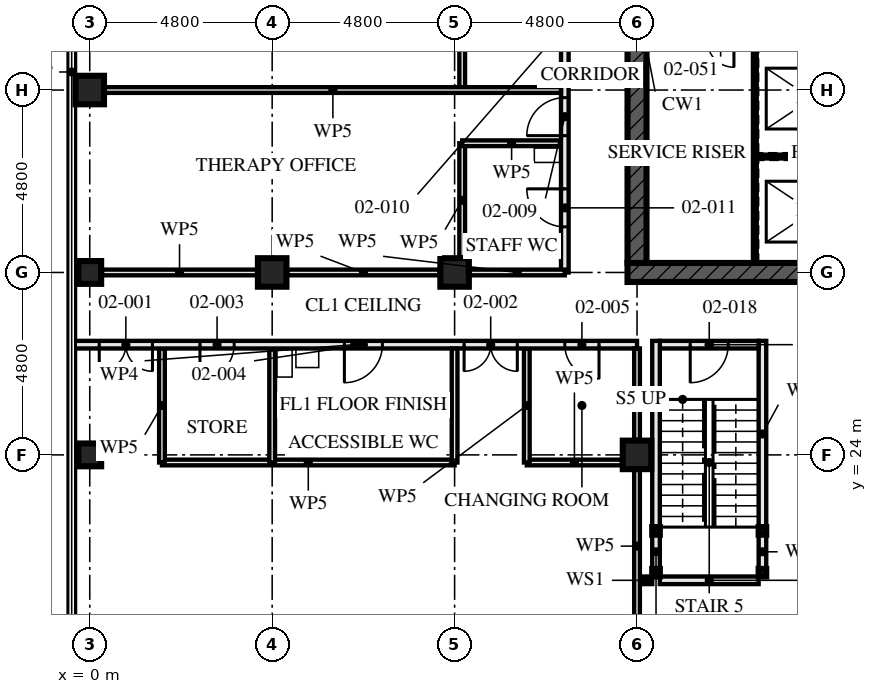
"""IFC4 building model, lengths in metres.
Left out: names, types, materials, properties, quantities, classifications, styles, units other than length and angle.
Written with IfcOpenShell. Run it as: python <this file> out.ifc"""

import sys

from ifc_helpers import new_model, si_unit, direction, frame, frame_2d, origin, origin_2d, place, context, subcontext, project, spatial, rectangle, hollow_rectangle, extrude, element, fill, save


model = new_model("IFC4")
c1 = context("Model", 3, precision=1e-05, world=origin(), true_north=direction((0.0, 1.0)))
c2 = subcontext(c1, "Body", "Model", "MODEL_VIEW")
j1 = project(units=[si_unit("LENGTHUNIT", "METRE"), si_unit("PLANEANGLEUNIT", "RADIAN")], contexts=[c1])
p1 = place(None, origin())
s1 = spatial("IfcSite", under=j1, at=p1, CompositionType="ELEMENT")
p2 = place(p1, origin())
s2 = spatial("IfcBuilding", under=s1, at=p2, CompositionType="ELEMENT")
p3 = place(p2, frame((0.0, 0.0, 9.0)))
s3 = spatial("IfcBuildingStorey", under=s2, at=p3, CompositionType="ELEMENT", Elevation=9.0)
for number, where, z_axis, x_axis in (
    (1, (0.0, 24.0, 0.0), (0.0, 0.0, 1.0), (1.0, 0.0, 0.0)),
    (2, (0.0, 28.8, 0.0), (0.0, 0.0, 1.0), (0.0, 1.0, 0.0)),
):
    element("IfcColumn", number, at=place(p3, frame(where, z_axis=z_axis, x_axis=x_axis)), inside=s3, PredefinedType="COLUMN", context=c2, shape_type="SweptSolid", body=[
        extrude(hollow_rectangle(XDim=0.6, YDim=0.6, WallThickness=0.08, at=origin_2d()), origin(), (0.0, 0.0, 1.0), 4.5),
    ])
for number, where, z_axis, x_axis in (
    (3, (0.0, 33.6, 0.0), (0.0, 0.0, 1.0), (1.0, 0.0, 0.0)),
    (4, (4.8, 28.8, 0.0), (0.0, 0.0, 1.0), (0.0, 1.0, 0.0)),
    (5, (9.6, 28.8, 0.0), (0.0, 0.0, 1.0), (0.0, 1.0, 0.0)),
    (6, (14.4, 24.0, 0.0), (0.0, 0.0, 1.0), (1.0, 0.0, 0.0)),
):
    element("IfcColumn", number, at=place(p3, frame(where, z_axis=z_axis, x_axis=x_axis)), inside=s3, PredefinedType="COLUMN", context=c2, shape_type="SweptSolid", body=[
        extrude(hollow_rectangle(XDim=0.75, YDim=0.75, WallThickness=0.08, at=origin_2d()), origin(), (0.0, 0.0, 1.0), 4.5),
    ])
p4 = place(p3, frame((14.15, 28.8, -0.17), z_axis=(0.0, 0.0, 1.0), x_axis=(1.0, 0.0, 0.0)))
e7 = element("IfcWall", 7, at=p4, inside=s3, PredefinedType="SHEAR", context=c2, shape_type="SweptSolid", body=[
    extrude(rectangle(XDim=14.9, YDim=0.5, at=frame_2d((7.45, 0.0))), origin(), (0.0, 0.0, 1.0), 4.5),
])
p5 = place(p4, frame((6.85, 0.0, 0.17)))
e8 = element("IfcOpeningElement", 8, at=p5, cuts=e7, PredefinedType="OPENING", context=c2, shape_type="SweptSolid", body=[
    extrude(rectangle(XDim=1.2, YDim=2.1, at=frame_2d((0.6, 1.05))), frame((0.0, 0.26, 0.0), z_axis=(0.0, -1.0, 0.0), x_axis=(1.0, 0.0, 0.0)), (0.0, 0.0, 1.0), 0.521),
])
p6 = place(p3, frame((14.4, 42.95, -0.17), z_axis=(0.0, 0.0, 1.0), x_axis=(0.0, -1.0, 0.0)))
e9 = element("IfcWall", 9, at=p6, inside=s3, PredefinedType="SHEAR", context=c2, shape_type="SweptSolid", body=[
    extrude(rectangle(XDim=13.9, YDim=0.5, at=frame_2d((6.95, 0.0))), origin(), (0.0, 0.0, 1.0), 4.5),
])
p7 = place(p6, frame((6.35, 0.0, 0.17)))
e10 = element("IfcOpeningElement", 10, at=p7, cuts=e9, PredefinedType="OPENING", context=c2, shape_type="SweptSolid", body=[
    extrude(rectangle(XDim=1.2, YDim=2.1, at=frame_2d((0.6, 1.05))), frame((0.0, 0.26, 0.0), z_axis=(0.0, -1.0, 0.0), x_axis=(1.0, 0.0, 0.0)), (0.0, 0.0, 1.0), 0.521),
])
for number, where, z_axis, x_axis in (
    (11, (14.9, 20.9, 0.0), (0.0, 0.0, 1.0), (1.0, 0.0, 0.0)),
    (12, (17.7, 20.9, 0.0), (0.0, 0.0, 1.0), (1.0, 0.0, 0.0)),
    (13, (14.9, 22.0, 0.0), (0.0, 0.0, 1.0), (1.0, 0.0, 0.0)),
    (14, (17.7, 22.0, 0.0), (0.0, 0.0, 1.0), (1.0, 0.0, 0.0)),
):
    element("IfcColumn", number, at=place(p3, frame(where, z_axis=z_axis, x_axis=x_axis)), inside=s3, PredefinedType="COLUMN", context=c2, shape_type="SweptSolid", body=[
        extrude(hollow_rectangle(XDim=0.2, YDim=0.2, WallThickness=0.008, at=origin_2d()), origin(), (0.0, 0.0, 1.0), 4.33),
    ])
for number, where, z_axis, x_axis in (
    (15, (9.6, 23.8, 0.0), (0.0, 0.0, 1.0), (0.0, 1.0, 0.0)),
    (16, (1.9, 23.8, 0.0), (0.0, 0.0, 1.0), (0.0, 1.0, 0.0)),
):
    element("IfcWall", number, at=place(p3, frame(where, z_axis=z_axis, x_axis=x_axis)), inside=s3, PredefinedType="PARTITIONING", context=c2, shape_type="SweptSolid", body=[
        extrude(rectangle(XDim=3.0, YDim=0.15, at=frame_2d((1.5, 0.0))), origin(), (0.0, 0.0, 1.0), 3.55),
    ])
p8 = place(p3, frame((1.9, 23.8, 0.0), z_axis=(0.0, 0.0, 1.0), x_axis=(1.0, 0.0, 0.0)))
e17 = element("IfcWall", 17, at=p8, inside=s3, PredefinedType="PARTITIONING", context=c2, shape_type="SweptSolid", body=[
    extrude(rectangle(XDim=7.7, YDim=0.15, at=frame_2d((3.85, 0.0))), origin(), (0.0, 0.0, 1.0), 4.33),
])
for number, where, z_axis, x_axis in (
    (18, (4.8, 23.8, 0.0), (0.0, 0.0, 1.0), (0.0, 1.0, 0.0)),
    (19, (11.5, 23.8, 0.0), (0.0, 0.0, 1.0), (0.0, 1.0, 0.0)),
):
    element("IfcWall", number, at=place(p3, frame(where, z_axis=z_axis, x_axis=x_axis)), inside=s3, PredefinedType="PARTITIONING", context=c2, shape_type="SweptSolid", body=[
        extrude(rectangle(XDim=3.0, YDim=0.15, at=frame_2d((1.5, 0.0))), origin(), (0.0, 0.0, 1.0), 3.55),
    ])
p9 = place(p3, frame((11.5, 23.8, 0.0), z_axis=(0.0, 0.0, 1.0), x_axis=(1.0, 0.0, 0.0)))
e20 = element("IfcWall", 20, at=p9, inside=s3, PredefinedType="PARTITIONING", context=c2, shape_type="SweptSolid", body=[
    extrude(rectangle(XDim=2.505, YDim=0.15, at=frame_2d((1.252, 0.0))), origin(), (0.0, 0.0, 1.0), 4.33),
])
p10 = place(p3, frame((-0.455, 26.9, 0.0), z_axis=(0.0, 0.0, 1.0), x_axis=(1.0, 0.0, 0.0)))
e21 = element("IfcWall", 21, at=p10, inside=s3, PredefinedType="PARTITIONING", context=c2, shape_type="SweptSolid", body=[
    extrude(rectangle(XDim=14.855, YDim=0.2, at=frame_2d((7.427, 0.0))), origin(), (0.0, 0.0, 1.0), 3.32),
])
p11 = place(p10, frame((0.705, 0.0, 0.0)))
e22 = element("IfcOpeningElement", 22, at=p11, cuts=e21, PredefinedType="OPENING", context=c2, shape_type="SweptSolid", body=[
    extrude(rectangle(XDim=1.4, YDim=2.4, at=frame_2d((0.7, 1.2))), frame((0.0, 0.111, 0.0), z_axis=(0.0, -1.0, 0.0), x_axis=(1.0, 0.0, 0.0)), (0.0, 0.0, 1.0), 0.221),
])
p12 = place(p10, frame((10.305, 0.0, 0.0)))
e23 = element("IfcOpeningElement", 23, at=p12, cuts=e21, PredefinedType="OPENING", context=c2, shape_type="SweptSolid", body=[
    extrude(rectangle(XDim=1.4, YDim=2.4, at=frame_2d((0.7, 1.2))), frame((0.0, 0.111, 0.0), z_axis=(0.0, -1.0, 0.0), x_axis=(1.0, 0.0, 0.0)), (0.0, 0.0, 1.0), 0.221),
])
p13 = place(p10, frame((3.355, 0.0, 0.0)))
e24 = element("IfcOpeningElement", 24, at=p13, cuts=e21, PredefinedType="OPENING", context=c2, shape_type="SweptSolid", body=[
    extrude(rectangle(XDim=0.9, YDim=2.1, at=frame_2d((0.45, 1.05))), frame((0.0, 0.111, 0.0), z_axis=(0.0, -1.0, 0.0), x_axis=(1.0, 0.0, 0.0)), (0.0, 0.0, 1.0), 0.221),
])
p14 = place(p10, frame((7.155, 0.0, 0.0)))
e25 = element("IfcOpeningElement", 25, at=p14, cuts=e21, PredefinedType="OPENING", context=c2, shape_type="SweptSolid", body=[
    extrude(rectangle(XDim=1.0, YDim=2.1, at=frame_2d((0.5, 1.05))), frame((0.0, 0.111, 0.0), z_axis=(0.0, -1.0, 0.0), x_axis=(1.0, 0.0, 0.0)), (0.0, 0.0, 1.0), 0.221),
])
p15 = place(p10, frame((12.955, 0.0, 0.0)))
e26 = element("IfcOpeningElement", 26, at=p15, cuts=e21, PredefinedType="OPENING", context=c2, shape_type="SweptSolid", body=[
    extrude(rectangle(XDim=0.9, YDim=2.1, at=frame_2d((0.45, 1.05))), frame((0.0, 0.111, 0.0), z_axis=(0.0, -1.0, 0.0), x_axis=(1.0, 0.0, 0.0)), (0.0, 0.0, 1.0), 0.221),
])
p16 = place(p3, frame((9.8, 37.0, 0.0), z_axis=(0.0, 0.0, 1.0), x_axis=(0.0, -1.0, 0.0)))
e27 = element("IfcWall", 27, at=p16, inside=s3, PredefinedType="PARTITIONING", context=c2, shape_type="SweptSolid", body=[
    extrude(rectangle(XDim=3.4, YDim=0.15, at=frame_2d((1.7, 0.0))), origin(), (0.0, 0.0, 1.0), 4.33),
])
p17 = place(p3, frame((9.8, 32.2, 0.0), z_axis=(0.0, 0.0, 1.0), x_axis=(1.0, 0.0, 0.0)))
e28 = element("IfcWall", 28, at=p17, inside=s3, PredefinedType="PARTITIONING", context=c2, shape_type="SweptSolid", body=[
    extrude(rectangle(XDim=2.6, YDim=0.15, at=frame_2d((1.3, 0.0))), origin(), (0.0, 0.0, 1.0), 4.33),
])
p18 = place(p3, frame((9.8, 32.2, 0.0), z_axis=(0.0, 0.0, 1.0), x_axis=(0.0, -1.0, 0.0)))
e29 = element("IfcWall", 29, at=p18, inside=s3, PredefinedType="PARTITIONING", context=c2, shape_type="SweptSolid", body=[
    extrude(rectangle(XDim=3.005, YDim=0.15, at=frame_2d((1.502, 0.0))), origin(), (0.0, 0.0, 1.0), 4.33),
])
p19 = place(p3, frame((0.395, 33.6, 0.0), z_axis=(0.0, 0.0, 1.0), x_axis=(1.0, 0.0, 0.0)))
e30 = element("IfcWall", 30, at=p19, inside=s3, PredefinedType="PARTITIONING", context=c2, shape_type="SweptSolid", body=[
    extrude(rectangle(XDim=12.005, YDim=0.15, at=frame_2d((6.002, 0.0))), origin(), (0.0, 0.0, 1.0), 3.55),
])
p20 = place(p3, frame((12.5, 43.2, 0.0), z_axis=(0.0, 0.0, 1.0), x_axis=(0.0, -1.0, 0.0)))
e31 = element("IfcWall", 31, at=p20, inside=s3, PredefinedType="PARTITIONING", context=c2, shape_type="SweptSolid", body=[
    extrude(rectangle(XDim=14.4, YDim=0.2, at=frame_2d((7.2, 0.0))), origin(), (0.0, 0.0, 1.0), 3.55),
])
p21 = place(p20, frame((1.4, 0.0, 0.0)))
e32 = element("IfcOpeningElement", 32, at=p21, cuts=e31, PredefinedType="OPENING", context=c2, shape_type="SweptSolid", body=[
    extrude(rectangle(XDim=1.0, YDim=2.1, at=frame_2d((0.5, 1.05))), frame((0.0, 0.111, 0.0), z_axis=(0.0, -1.0, 0.0), x_axis=(1.0, 0.0, 0.0)), (0.0, 0.0, 1.0), 0.221),
])
p22 = place(p20, frame((3.6, 0.0, 0.0)))
e33 = element("IfcOpeningElement", 33, at=p22, cuts=e31, PredefinedType="OPENING", context=c2, shape_type="SweptSolid", body=[
    extrude(rectangle(XDim=1.0, YDim=2.4, at=frame_2d((0.5, 1.2))), frame((0.0, 0.111, 0.0), z_axis=(0.0, -1.0, 0.0), x_axis=(1.0, 0.0, 0.0)), (0.0, 0.0, 1.0), 0.221),
])
p23 = place(p20, frame((5.0, 0.0, 0.0)))
e34 = element("IfcOpeningElement", 34, at=p23, cuts=e31, PredefinedType="OPENING", context=c2, shape_type="SweptSolid", body=[
    extrude(rectangle(XDim=1.0, YDim=2.4, at=frame_2d((0.5, 1.2))), frame((0.0, 0.111, 0.0), z_axis=(0.0, -1.0, 0.0), x_axis=(1.0, 0.0, 0.0)), (0.0, 0.0, 1.0), 0.221),
])
p24 = place(p20, frame((9.8, 0.0, 0.0)))
e35 = element("IfcOpeningElement", 35, at=p24, cuts=e31, PredefinedType="OPENING", context=c2, shape_type="SweptSolid", body=[
    extrude(rectangle(XDim=1.0, YDim=2.4, at=frame_2d((0.5, 1.2))), frame((0.0, 0.111, 0.0), z_axis=(0.0, -1.0, 0.0), x_axis=(1.0, 0.0, 0.0)), (0.0, 0.0, 1.0), 0.221),
])
p25 = place(p20, frame((7.45, 0.0, 0.0)))
e36 = element("IfcOpeningElement", 36, at=p25, cuts=e31, PredefinedType="OPENING", context=c2, shape_type="SweptSolid", body=[
    extrude(rectangle(XDim=0.9, YDim=2.1, at=frame_2d((0.45, 1.05))), frame((0.0, 0.111, 0.0), z_axis=(0.0, -1.0, 0.0), x_axis=(1.0, 0.0, 0.0)), (0.0, 0.0, 1.0), 0.221),
])
p26 = place(p20, frame((12.2, 0.0, 0.0)))
e37 = element("IfcOpeningElement", 37, at=p26, cuts=e31, PredefinedType="OPENING", context=c2, shape_type="SweptSolid", body=[
    extrude(rectangle(XDim=1.0, YDim=2.1, at=frame_2d((0.5, 1.05))), frame((0.0, 0.111, 0.0), z_axis=(0.0, -1.0, 0.0), x_axis=(1.0, 0.0, 0.0)), (0.0, 0.0, 1.0), 0.221),
])
p27 = place(p3, frame((14.9, 21.0, 0.0), z_axis=(0.0, 0.0, 1.0), x_axis=(0.0, 1.0, 0.0)))
e38 = element("IfcWall", 38, at=p27, inside=s3, PredefinedType="SOLIDWALL", context=c2, shape_type="SweptSolid", body=[
    extrude(rectangle(XDim=0.9, YDim=0.2, at=frame_2d((0.45, 0.0))), origin(), (0.0, 0.0, 1.0), 3.99),
])
p28 = place(p3, frame((14.9, 22.1, 0.0), z_axis=(0.0, 0.0, 1.0), x_axis=(0.0, 1.0, 0.0)))
e39 = element("IfcWall", 39, at=p28, inside=s3, PredefinedType="SOLIDWALL", context=c2, shape_type="SweptSolid", body=[
    extrude(rectangle(XDim=4.9, YDim=0.2, at=frame_2d((2.45, 0.0))), origin(), (0.0, 0.0, 1.0), 3.99),
])
p29 = place(p3, frame((17.7, 21.0, 0.0), z_axis=(0.0, 0.0, 1.0), x_axis=(0.0, 1.0, 0.0)))
e40 = element("IfcWall", 40, at=p29, inside=s3, PredefinedType="SOLIDWALL", context=c2, shape_type="SweptSolid", body=[
    extrude(rectangle(XDim=0.9, YDim=0.2, at=frame_2d((0.45, 0.0))), origin(), (0.0, 0.0, 1.0), 3.99),
])
p30 = place(p3, frame((17.7, 22.1, 0.0), z_axis=(0.0, 0.0, 1.0), x_axis=(0.0, 1.0, 0.0)))
e41 = element("IfcWall", 41, at=p30, inside=s3, PredefinedType="SOLIDWALL", context=c2, shape_type="SweptSolid", body=[
    extrude(rectangle(XDim=4.9, YDim=0.2, at=frame_2d((2.45, 0.0))), origin(), (0.0, 0.0, 1.0), 3.99),
])
p31 = place(p3, frame((14.475, 20.7, 0.0), z_axis=(0.0, 0.0, 1.0), x_axis=(1.0, 0.0, 0.0)))
e42 = element("IfcWall", 42, at=p31, inside=s3, PredefinedType="SOLIDWALL", context=c2, shape_type="SweptSolid", body=[
    extrude(rectangle(XDim=0.325, YDim=0.2, at=frame_2d((0.163, 0.0))), origin(), (0.0, 0.0, 1.0), 4.33),
])
p32 = place(p3, frame((15.0, 20.7, 0.0), z_axis=(0.0, 0.0, 1.0), x_axis=(1.0, 0.0, 0.0)))
e43 = element("IfcWall", 43, at=p32, inside=s3, PredefinedType="SOLIDWALL", context=c2, shape_type="SweptSolid", body=[
    extrude(rectangle(XDim=2.6, YDim=0.2, at=frame_2d((1.3, 0.0))), origin(), (0.0, 0.0, 1.0), 4.33),
])
p33 = place(p3, frame((15.0, 26.9, 0.0), z_axis=(0.0, 0.0, 1.0), x_axis=(1.0, 0.0, 0.0)))
e44 = element("IfcWall", 44, at=p33, inside=s3, PredefinedType="SOLIDWALL", context=c2, shape_type="SweptSolid", body=[
    extrude(rectangle(XDim=2.6, YDim=0.2, at=frame_2d((1.3, 0.0))), origin(), (0.0, 0.0, 1.0), 4.33),
])
p34 = place(p33, frame((0.8, 0.0, 0.0)))
e45 = element("IfcOpeningElement", 45, at=p34, cuts=e44, PredefinedType="OPENING", context=c2, shape_type="SweptSolid", body=[
    extrude(rectangle(XDim=1.0, YDim=2.1, at=frame_2d((0.5, 1.05))), frame((0.0, 0.111, 0.0), z_axis=(0.0, -1.0, 0.0), x_axis=(1.0, 0.0, 0.0)), (0.0, 0.0, 1.0), 0.221),
])
p35 = place(p3, frame((17.5, 29.05, 0.0), z_axis=(0.0, 0.0, 1.0), x_axis=(0.0, 1.0, 0.0)))
e46 = element("IfcWall", 46, at=p35, inside=s3, PredefinedType="SOLIDWALL", context=c2, shape_type="SweptSolid", body=[
    extrude(rectangle(XDim=5.8, YDim=0.1, at=frame_2d((2.9, 0.0))), origin(), (0.0, 0.0, 1.0), 4.33),
])
p36 = place(p3, frame((17.55, 31.85, 0.0), z_axis=(0.0, 0.0, 1.0), x_axis=(1.0, 0.0, 0.0)))
e47 = element("IfcWall", 47, at=p36, inside=s3, PredefinedType="SOLIDWALL", context=c2, shape_type="SweptSolid", body=[
    extrude(rectangle(XDim=2.9, YDim=0.1, at=frame_2d((1.45, 0.0))), origin(), (0.0, 0.0, 1.0), 4.33),
])
p37 = place(p3, frame((12.5, 28.8, 0.0), z_axis=(0.0, 0.0, 1.0), x_axis=(-1.0, 0.0, 0.0)))
e48 = element("IfcWall", 48, at=p37, inside=s3, PredefinedType="PARTITIONING", context=c2, shape_type="SweptSolid", body=[
    extrude(rectangle(XDim=2.505, YDim=0.15, at=frame_2d((1.252, 0.0))), origin(), (0.0, 0.0, 1.0), 3.32),
])
p38 = place(p3, frame((9.205, 28.8, 0.0), z_axis=(0.0, 0.0, 1.0), x_axis=(-1.0, 0.0, 0.0)))
e49 = element("IfcWall", 49, at=p38, inside=s3, PredefinedType="PARTITIONING", context=c2, shape_type="SweptSolid", body=[
    extrude(rectangle(XDim=4.01, YDim=0.15, at=frame_2d((2.005, 0.0))), origin(), (0.0, 0.0, 1.0), 3.32),
])
p39 = place(p3, frame((4.405, 28.8, 0.0), z_axis=(0.0, 0.0, 1.0), x_axis=(-1.0, 0.0, 0.0)))
e50 = element("IfcWall", 50, at=p39, inside=s3, PredefinedType="PARTITIONING", context=c2, shape_type="SweptSolid", body=[
    extrude(rectangle(XDim=4.085, YDim=0.15, at=frame_2d((2.042, 0.0))), origin(), (0.0, 0.0, 1.0), 3.32),
])
p40 = place(p3, frame((14.4, 19.595, 0.0), z_axis=(0.0, 0.0, 1.0), x_axis=(0.0, 1.0, 0.0)))
e51 = element("IfcWall", 51, at=p40, inside=s3, PredefinedType="PARTITIONING", context=c2, shape_type="SweptSolid", body=[
    extrude(rectangle(XDim=4.01, YDim=0.15, at=frame_2d((2.005, 0.0))), origin(), (0.0, 0.0, 1.0), 3.32),
])
p41 = place(p3, frame((14.4, 24.395, 0.0), z_axis=(0.0, 0.0, 1.0), x_axis=(0.0, 1.0, 0.0)))
e52 = element("IfcWall", 52, at=p41, inside=s3, PredefinedType="PARTITIONING", context=c2, shape_type="SweptSolid", body=[
    extrude(rectangle(XDim=2.405, YDim=0.15, at=frame_2d((1.203, 0.0))), origin(), (0.0, 0.0, 1.0), 3.32),
])
p42 = place(p11, frame((1.4, 0.0, 0.0), z_axis=(0.0, 0.0, 1.0), x_axis=(-1.0, 0.0, 0.0)))
e53 = element("IfcDoor", 53, at=p42, inside=s3, OperationType="DOUBLE_DOOR_SINGLE_SWING", PredefinedType="DOOR", context=c2, shape_type="SweptSolid", body=[
    extrude(rectangle(XDim=1.4, YDim=2.4, at=frame_2d((0.7, 1.2))), frame((0.0, 0.027, 0.0), z_axis=(0.0, -1.0, 0.0), x_axis=(1.0, 0.0, 0.0)), (0.0, 0.0, 1.0), 0.054),
])
fill(e22, e53)
p43 = place(p12, frame((1.4, 0.0, 0.0), z_axis=(0.0, 0.0, 1.0), x_axis=(-1.0, 0.0, 0.0)))
e54 = element("IfcDoor", 54, at=p43, inside=s3, OperationType="DOUBLE_DOOR_SINGLE_SWING", PredefinedType="DOOR", context=c2, shape_type="SweptSolid", body=[
    extrude(rectangle(XDim=1.4, YDim=2.4, at=frame_2d((0.7, 1.2))), frame((0.0, 0.027, 0.0), z_axis=(0.0, -1.0, 0.0), x_axis=(1.0, 0.0, 0.0)), (0.0, 0.0, 1.0), 0.054),
])
fill(e23, e54)
p44 = place(p13, frame((0.9, 0.0, 0.0), z_axis=(0.0, 0.0, 1.0), x_axis=(-1.0, 0.0, 0.0)))
e55 = element("IfcDoor", 55, at=p44, inside=s3, OperationType="SINGLE_SWING_LEFT", PredefinedType="DOOR", context=c2, shape_type="SweptSolid", body=[
    extrude(rectangle(XDim=0.9, YDim=2.1, at=frame_2d((0.45, 1.05))), frame((0.0, 0.027, 0.0), z_axis=(0.0, -1.0, 0.0), x_axis=(1.0, 0.0, 0.0)), (0.0, 0.0, 1.0), 0.054),
])
fill(e24, e55)
p45 = place(p14, frame((1.0, 0.0, 0.0), z_axis=(0.0, 0.0, 1.0), x_axis=(-1.0, 0.0, 0.0)))
e56 = element("IfcDoor", 56, at=p45, inside=s3, OperationType="SINGLE_SWING_LEFT", PredefinedType="DOOR", context=c2, shape_type="SweptSolid", body=[
    extrude(rectangle(XDim=1.0, YDim=2.1, at=frame_2d((0.5, 1.05))), frame((0.0, 0.027, 0.0), z_axis=(0.0, -1.0, 0.0), x_axis=(1.0, 0.0, 0.0)), (0.0, 0.0, 1.0), 0.054),
])
fill(e25, e56)
p46 = place(p15, frame((0.9, 0.0, 0.0), z_axis=(0.0, 0.0, 1.0), x_axis=(-1.0, 0.0, 0.0)))
e57 = element("IfcDoor", 57, at=p46, inside=s3, OperationType="SINGLE_SWING_RIGHT", PredefinedType="DOOR", context=c2, shape_type="SweptSolid", body=[
    extrude(rectangle(XDim=0.9, YDim=2.1, at=frame_2d((0.45, 1.05))), frame((0.0, 0.027, 0.0), z_axis=(0.0, -1.0, 0.0), x_axis=(1.0, 0.0, 0.0)), (0.0, 0.0, 1.0), 0.054),
])
fill(e26, e57)
p47 = place(p24, frame((1.0, 0.0, 0.0), z_axis=(0.0, 0.0, 1.0), x_axis=(-1.0, 0.0, 0.0)))
e58 = element("IfcDoor", 58, at=p47, inside=s3, OperationType="SINGLE_SWING_RIGHT", PredefinedType="DOOR", context=c2, shape_type="SweptSolid", body=[
    extrude(rectangle(XDim=1.0, YDim=2.4, at=frame_2d((0.5, 1.2))), frame((0.0, 0.027, 0.0), z_axis=(0.0, -1.0, 0.0), x_axis=(1.0, 0.0, 0.0)), (0.0, 0.0, 1.0), 0.054),
])
fill(e35, e58)
p48 = place(p26, frame((1.0, 0.0, 0.0), z_axis=(0.0, 0.0, 1.0), x_axis=(-1.0, 0.0, 0.0)))
e59 = element("IfcDoor", 59, at=p48, inside=s3, OperationType="SINGLE_SWING_LEFT", PredefinedType="DOOR", context=c2, shape_type="SweptSolid", body=[
    extrude(rectangle(XDim=1.0, YDim=2.1, at=frame_2d((0.5, 1.05))), frame((0.0, 0.027, 0.0), z_axis=(0.0, -1.0, 0.0), x_axis=(1.0, 0.0, 0.0)), (0.0, 0.0, 1.0), 0.054),
])
fill(e37, e59)
p49 = place(p34, frame((1.0, 0.0, 0.0), z_axis=(0.0, 0.0, 1.0), x_axis=(-1.0, 0.0, 0.0)))
e60 = element("IfcDoor", 60, at=p49, inside=s3, OperationType="SINGLE_SWING_LEFT", PredefinedType="DOOR", context=c2, shape_type="SweptSolid", body=[
    extrude(rectangle(XDim=1.0, YDim=2.1, at=frame_2d((0.5, 1.05))), frame((0.0, 0.032, 0.0), z_axis=(0.0, -1.0, 0.0), x_axis=(1.0, 0.0, 0.0)), (0.0, 0.0, 1.0), 0.064),
])
fill(e45, e60)
save(model, sys.argv[1])
